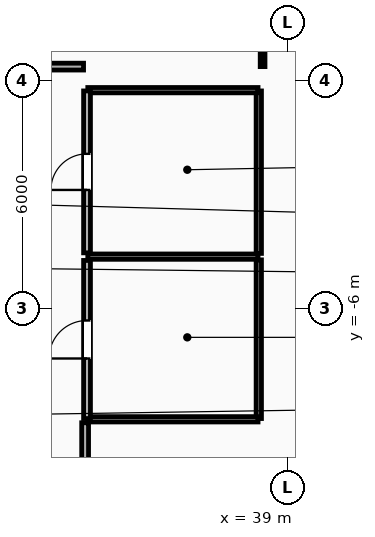
"""IFC4 building model, lengths in metres.
Left out: names, types, materials, properties, quantities, classifications, styles, units other than length and angle.
Written with IfcOpenShell. Run it as: python <this file> out.ifc"""

import sys

from ifc_helpers import new_model, si_unit, direction, frame, frame_2d, origin, place, context, subcontext, project, spatial, rectangle, extrude, element, fill, save


model = new_model("IFC4")
c1 = context("Model", 3, precision=1e-05, world=origin(), true_north=direction((0.0, 1.0)))
c2 = subcontext(c1, "Body", "Model", "MODEL_VIEW")
j1 = project(units=[si_unit("LENGTHUNIT", "METRE"), si_unit("PLANEANGLEUNIT", "RADIAN")], contexts=[c1])
p1 = place(None, origin())
s1 = spatial("IfcSite", under=j1, at=p1, CompositionType="ELEMENT")
p2 = place(p1, origin())
s2 = spatial("IfcBuilding", under=s1, at=p2, CompositionType="ELEMENT")
p3 = place(p2, frame((0.0, 0.0, 227.8)))
s3 = spatial("IfcBuildingStorey", under=s2, at=p3, CompositionType="ELEMENT", Elevation=227.8)
p4 = place(p3, frame((38.24, -8.89, 0.0), z_axis=(0.0, 0.0, 1.0), x_axis=(0.0, 1.0, 0.0)))
e1 = element("IfcWall", 1, at=p4, inside=s3, PredefinedType="PARTITIONING", context=c2, shape_type="SweptSolid", body=[
    extrude(rectangle(XDim=4.175, YDim=0.14, at=frame_2d((2.087, 0.0))), origin(), (0.0, 0.0, 1.0), 3.34),
])
p5 = place(p3, frame((38.24, -4.545, 0.0), z_axis=(0.0, 0.0, 1.0), x_axis=(0.0, 1.0, 0.0)))
e2 = element("IfcWall", 2, at=p5, inside=s3, PredefinedType="PARTITIONING", context=c2, shape_type="SweptSolid", body=[
    extrude(rectangle(XDim=4.275, YDim=0.14, at=frame_2d((2.137, 0.0))), origin(), (0.0, 0.0, 1.0), 3.34),
])
for number, where, z_axis, x_axis in (
    (3, (33.74, -0.25, 0.0), (0.0, 0.0, 1.0), (1.0, 0.0, 0.0)),
    (4, (33.74, -4.63, 0.0), (0.0, 0.0, 1.0), (1.0, 0.0, 0.0)),
    (5, (33.74, -8.91, 0.0), (0.0, 0.0, 1.0), (1.0, 0.0, 0.0)),
):
    element("IfcWall", number, at=place(p3, frame(where, z_axis=z_axis, x_axis=x_axis)), inside=s3, PredefinedType="PARTITIONING", context=c2, shape_type="SweptSolid", body=[
        extrude(rectangle(XDim=4.48, YDim=0.14, at=frame_2d((2.24, 0.0))), origin(), (0.0, 0.0, 1.0), 3.34),
    ])
p6 = place(p3, frame((33.72, -4.53, 0.0), z_axis=(0.0, 0.0, 1.0), x_axis=(0.0, 1.0, 0.0)))
e6 = element("IfcWall", 6, at=p6, inside=s3, PredefinedType="PARTITIONING", context=c2, shape_type="SweptSolid", body=[
    extrude(rectangle(XDim=4.26, YDim=0.18, at=frame_2d((2.13, 0.0))), origin(), (0.0, 0.0, 1.0), 3.34),
])
p7 = place(p6, frame((1.655, 0.0, 0.0)))
e7 = element("IfcOpeningElement", 7, at=p7, cuts=e6, PredefinedType="OPENING", context=c2, shape_type="SweptSolid", body=[
    extrude(rectangle(XDim=0.95, YDim=2.1, at=frame_2d((0.475, 1.05))), frame((0.0, 0.1, 0.0), z_axis=(0.0, -1.0, 0.0), x_axis=(1.0, 0.0, 0.0)), (0.0, 0.0, 1.0), 0.2),
])
p8 = place(p3, frame((33.72, -8.89, 0.0), z_axis=(0.0, 0.0, 1.0), x_axis=(0.0, 1.0, 0.0)))
e8 = element("IfcWall", 8, at=p8, inside=s3, PredefinedType="PARTITIONING", context=c2, shape_type="SweptSolid", body=[
    extrude(rectangle(XDim=4.16, YDim=0.18, at=frame_2d((2.08, 0.0))), origin(), (0.0, 0.0, 1.0), 3.34),
])
p9 = place(p8, frame((1.58, 0.0, 0.0)))
e9 = element("IfcOpeningElement", 9, at=p9, cuts=e8, PredefinedType="OPENING", context=c2, shape_type="SweptSolid", body=[
    extrude(rectangle(XDim=1.0, YDim=2.15, at=frame_2d((0.5, 1.075))), frame((0.0, 0.1, 0.0), z_axis=(0.0, -1.0, 0.0), x_axis=(1.0, 0.0, 0.0)), (0.0, 0.0, 1.0), 0.2),
])
p10 = place(p3, frame((38.34, 0.37, 0.0), z_axis=(0.0, 0.0, 1.0), x_axis=(0.0, 1.0, 0.0)))
e10 = element("IfcWall", 10, at=p10, inside=s3, PredefinedType="PARTITIONING", context=c2, shape_type="SweptSolid", body=[
    extrude(rectangle(XDim=23.885, YDim=0.125, at=frame_2d((11.942, 0.0))), origin(), (0.0, 0.0, 1.0), 3.34),
])
p11 = place(p3, frame((33.628, 0.37, 0.0), z_axis=(0.0, 0.0, 1.0), x_axis=(-1.0, 0.0, 0.0)))
e11 = element("IfcWall", 11, at=p11, inside=s3, PredefinedType="PARTITIONING", context=c2, shape_type="SweptSolid", body=[
    extrude(rectangle(XDim=5.628, YDim=0.18, at=frame_2d((2.814, 0.0))), origin(), (0.0, 0.0, 1.0), 3.34),
])
p12 = place(p3, frame((33.67, -10.3, 0.0), z_axis=(0.0, 0.0, 1.0), x_axis=(0.0, 1.0, 0.0)))
e12 = element("IfcWall", 12, at=p12, inside=s3, PredefinedType="PARTITIONING", context=c2, shape_type="SweptSolid", body=[
    extrude(rectangle(XDim=1.299, YDim=0.18, at=frame_2d((0.649, 0.0))), origin(), (0.0, 0.0, 1.0), 3.34),
])
p13 = place(p7, origin())
e13 = element("IfcDoor", 13, at=p13, inside=s3, OperationType="SINGLE_SWING_LEFT", PredefinedType="DOOR", context=c2, shape_type="SweptSolid", body=[
    extrude(rectangle(XDim=0.95, YDim=2.1, at=frame_2d((0.475, 1.05))), frame((0.0, 0.025, 0.0), z_axis=(0.0, -1.0, 0.0), x_axis=(1.0, 0.0, 0.0)), (0.0, 0.0, 1.0), 0.05),
])
fill(e7, e13)
p14 = place(p9, origin())
e14 = element("IfcDoor", 14, at=p14, inside=s3, OperationType="SINGLE_SWING_LEFT", PredefinedType="DOOR", context=c2, shape_type="SweptSolid", body=[
    extrude(rectangle(XDim=1.0, YDim=2.15, at=frame_2d((0.5, 1.075))), frame((0.0, 0.025, 0.0), z_axis=(0.0, -1.0, 0.0), x_axis=(1.0, 0.0, 0.0)), (0.0, 0.0, 1.0), 0.05),
])
fill(e9, e14)
save(model, sys.argv[1])
